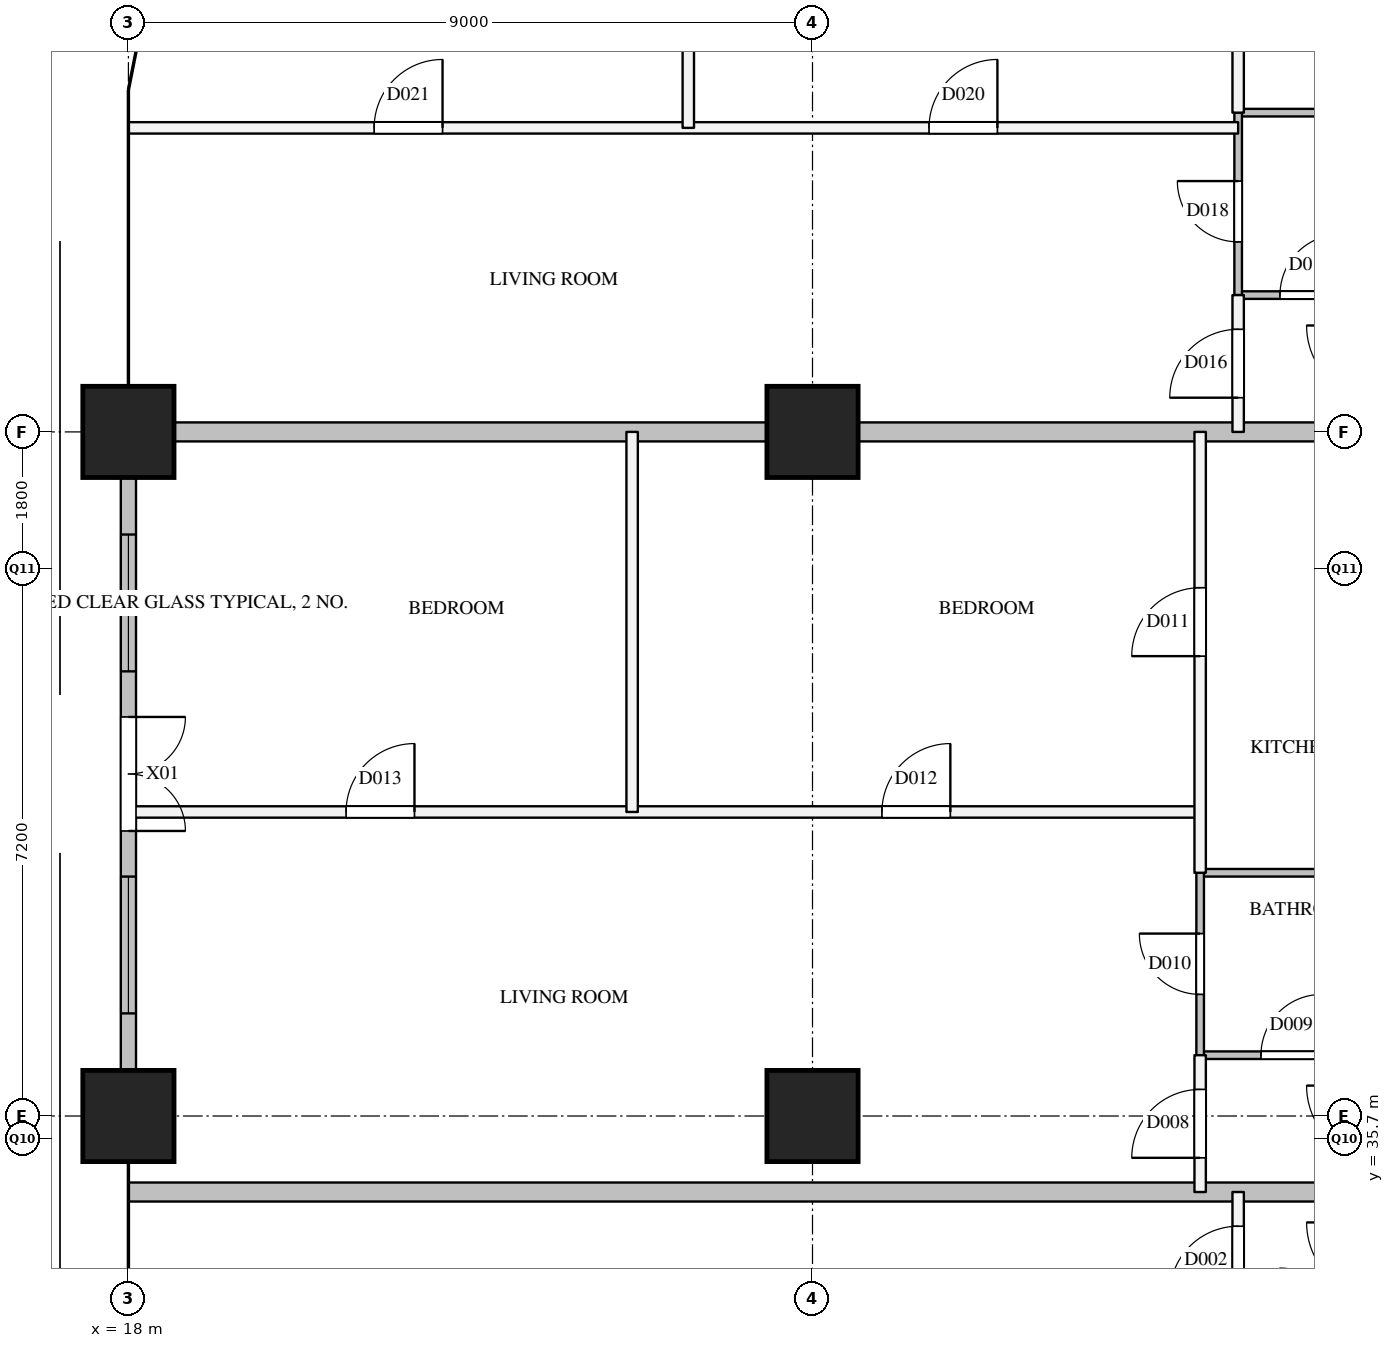
"""IFC4 building model, lengths in metres.
Left out: names, types, materials, properties, quantities, classifications, styles, units other than length and angle.
Written with IfcOpenShell. Run it as: python <this file> out.ifc"""

import sys

from ifc_helpers import new_model, si_unit, direction, frame, frame_2d, origin, origin_2d, place, context, subcontext, project, spatial, rectangle, extrude, element, fill, save


model = new_model("IFC4")
c1 = context("Model", 3, precision=1e-05, world=origin(), true_north=direction((0.0, 1.0)))
c2 = subcontext(c1, "Body", "Model", "MODEL_VIEW")
j1 = project(units=[si_unit("LENGTHUNIT", "METRE"), si_unit("PLANEANGLEUNIT", "RADIAN")], contexts=[c1])
p1 = place(None, origin())
s1 = spatial("IfcSite", under=j1, at=p1, CompositionType="ELEMENT")
p2 = place(p1, origin())
s2 = spatial("IfcBuilding", under=s1, at=p2, CompositionType="ELEMENT")
p3 = place(p2, frame((0.0, 0.0, 234.5)))
s3 = spatial("IfcBuildingStorey", under=s2, at=p3, CompositionType="ELEMENT", Elevation=234.5)
for number, where, z_axis, x_axis in (
    (1, (18.0, 36.0, 0.0), (0.0, 0.0, 1.0), (1.0, 0.0, 0.0)),
    (2, (18.0, 45.0, 0.0), (0.0, 0.0, 1.0), (1.0, 0.0, 0.0)),
    (3, (27.0, 36.0, 0.0), (0.0, 0.0, 1.0), (1.0, 0.0, 0.0)),
    (4, (27.0, 45.0, 0.0), (0.0, 0.0, 1.0), (1.0, 0.0, 0.0)),
):
    element("IfcColumn", number, at=place(p3, frame(where, z_axis=z_axis, x_axis=x_axis)), inside=s3, PredefinedType="COLUMN", context=c2, shape_type="SweptSolid", body=[
        extrude(rectangle(XDim=1.2, YDim=1.2, at=origin_2d()), origin(), (0.0, 0.0, 1.0), 3.9),
    ])
p4 = place(p3, frame((18.0, 44.4, 0.0), z_axis=(0.0, 0.0, 1.0), x_axis=(0.0, -1.0, 0.0)))
e5 = element("IfcWall", 5, at=p4, inside=s3, PredefinedType="SOLIDWALL", context=c2, shape_type="SweptSolid", body=[
    extrude(rectangle(XDim=7.8, YDim=0.2, at=frame_2d((3.9, 0.0))), origin(), (0.0, 0.0, 1.0), 2.6),
])
p5 = place(p4, frame((3.15, 0.0, 0.0)))
e6 = element("IfcOpeningElement", 6, at=p5, cuts=e5, PredefinedType="OPENING", context=c2, shape_type="SweptSolid", body=[
    extrude(rectangle(XDim=1.5, YDim=2.1, at=frame_2d((0.75, 1.05))), frame((0.0, 0.11, 0.0), z_axis=(0.0, -1.0, 0.0), x_axis=(1.0, 0.0, 0.0)), (0.0, 0.0, 1.0), 0.22),
])
p6 = place(p4, frame((0.75, 0.0, 0.1)))
e7 = element("IfcOpeningElement", 7, at=p6, cuts=e5, PredefinedType="OPENING", context=c2, shape_type="SweptSolid", body=[
    extrude(rectangle(XDim=1.8, YDim=2.2, at=frame_2d((0.9, 1.1))), frame((0.0, 0.11, 0.0), z_axis=(0.0, -1.0, 0.0), x_axis=(1.0, 0.0, 0.0)), (0.0, 0.0, 1.0), 0.22),
])
p7 = place(p4, frame((5.25, 0.0, 0.1)))
e8 = element("IfcOpeningElement", 8, at=p7, cuts=e5, PredefinedType="OPENING", context=c2, shape_type="SweptSolid", body=[
    extrude(rectangle(XDim=1.8, YDim=2.2, at=frame_2d((0.9, 1.1))), frame((0.0, 0.11, 0.0), z_axis=(0.0, -1.0, 0.0), x_axis=(1.0, 0.0, 0.0)), (0.0, 0.0, 1.0), 0.22),
])
p8 = place(p3, frame((18.025, 40.0, 0.0), z_axis=(0.0, 0.0, 1.0), x_axis=(1.0, 0.0, 0.0)))
e9 = element("IfcWall", 9, at=p8, inside=s3, PredefinedType="PARTITIONING", context=c2, shape_type="SweptSolid", body=[
    extrude(rectangle(XDim=14.075, YDim=0.15, at=frame_2d((7.037, 0.0))), origin(), (0.0, 0.0, 1.0), 2.6),
])
p9 = place(p8, frame((9.888, 0.0, 0.0)))
e10 = element("IfcOpeningElement", 10, at=p9, cuts=e9, PredefinedType="OPENING", context=c2, shape_type="SweptSolid", body=[
    extrude(rectangle(XDim=0.9, YDim=2.1, at=frame_2d((0.45, 1.05))), frame((0.0, 0.085, 0.0), z_axis=(0.0, -1.0, 0.0), x_axis=(1.0, 0.0, 0.0)), (0.0, 0.0, 1.0), 0.17),
])
p10 = place(p8, frame((2.838, 0.0, 0.0)))
e11 = element("IfcOpeningElement", 11, at=p10, cuts=e9, PredefinedType="OPENING", context=c2, shape_type="SweptSolid", body=[
    extrude(rectangle(XDim=0.9, YDim=2.1, at=frame_2d((0.45, 1.05))), frame((0.0, 0.085, 0.0), z_axis=(0.0, -1.0, 0.0), x_axis=(1.0, 0.0, 0.0)), (0.0, 0.0, 1.0), 0.17),
])
p11 = place(p3, frame((18.0, 49.0, 0.0), z_axis=(0.0, 0.0, 1.0), x_axis=(1.0, 0.0, 0.0)))
e12 = element("IfcWall", 12, at=p11, inside=s3, PredefinedType="PARTITIONING", context=c2, shape_type="SweptSolid", body=[
    extrude(rectangle(XDim=14.6, YDim=0.15, at=frame_2d((7.3, 0.0))), origin(), (0.0, 0.0, 1.0), 2.6),
])
p12 = place(p11, frame((10.533, 0.0, 0.0)))
e13 = element("IfcOpeningElement", 13, at=p12, cuts=e12, PredefinedType="OPENING", context=c2, shape_type="SweptSolid", body=[
    extrude(rectangle(XDim=0.9, YDim=2.1, at=frame_2d((0.45, 1.05))), frame((0.0, 0.085, 0.0), z_axis=(0.0, -1.0, 0.0), x_axis=(1.0, 0.0, 0.0)), (0.0, 0.0, 1.0), 0.17),
])
p13 = place(p11, frame((3.233, 0.0, 0.0)))
e14 = element("IfcOpeningElement", 14, at=p13, cuts=e12, PredefinedType="OPENING", context=c2, shape_type="SweptSolid", body=[
    extrude(rectangle(XDim=0.9, YDim=2.1, at=frame_2d((0.45, 1.05))), frame((0.0, 0.085, 0.0), z_axis=(0.0, -1.0, 0.0), x_axis=(1.0, 0.0, 0.0)), (0.0, 0.0, 1.0), 0.17),
])
p14 = place(p3, frame((24.627, 40.0, 0.0), z_axis=(0.0, 0.0, 1.0), x_axis=(0.0, 1.0, 0.0)))
e15 = element("IfcWall", 15, at=p14, inside=s3, PredefinedType="PARTITIONING", context=c2, shape_type="SweptSolid", body=[
    extrude(rectangle(XDim=5.0, YDim=0.15, at=frame_2d((2.5, 0.0))), origin(), (0.0, 0.0, 1.0), 3.6),
])
p15 = place(p3, frame((25.366, 49.0, 0.0), z_axis=(0.0, 0.0, 1.0), x_axis=(0.0, 1.0, 0.0)))
e16 = element("IfcWall", 16, at=p15, inside=s3, PredefinedType="PARTITIONING", context=c2, shape_type="SweptSolid", body=[
    extrude(rectangle(XDim=5.0, YDim=0.15, at=frame_2d((2.5, 0.0))), origin(), (0.0, 0.0, 1.0), 2.6),
])
p16 = place(p3, frame((32.1, 35.0, 0.0), z_axis=(0.0, 0.0, 1.0), x_axis=(0.0, 1.0, 0.0)))
e17 = element("IfcWall", 17, at=p16, inside=s3, PredefinedType="PARTITIONING", context=c2, shape_type="SweptSolid", body=[
    extrude(rectangle(XDim=1.8, YDim=0.15, at=frame_2d((0.9, 0.0))), origin(), (0.0, 0.0, 1.0), 3.6),
])
p17 = place(p16, frame((0.45, 0.0, 0.0)))
e18 = element("IfcOpeningElement", 18, at=p17, cuts=e17, PredefinedType="OPENING", context=c2, shape_type="SweptSolid", body=[
    extrude(rectangle(XDim=0.9, YDim=2.1, at=frame_2d((0.45, 1.05))), frame((0.0, 0.085, 0.0), z_axis=(0.0, -1.0, 0.0), x_axis=(1.0, 0.0, 0.0)), (0.0, 0.0, 1.0), 0.17),
])
p18 = place(p3, frame((32.1, 39.2, 0.0), z_axis=(0.0, 0.0, 1.0), x_axis=(0.0, 1.0, 0.0)))
e19 = element("IfcWall", 19, at=p18, inside=s3, PredefinedType="PARTITIONING", context=c2, shape_type="SweptSolid", body=[
    extrude(rectangle(XDim=5.8, YDim=0.15, at=frame_2d((2.9, 0.0))), origin(), (0.0, 0.0, 1.0), 3.6),
])
p19 = place(p18, frame((2.85, 0.0, 0.0)))
e20 = element("IfcOpeningElement", 20, at=p19, cuts=e19, PredefinedType="OPENING", context=c2, shape_type="SweptSolid", body=[
    extrude(rectangle(XDim=0.9, YDim=2.1, at=frame_2d((0.45, 1.05))), frame((0.0, 0.085, 0.0), z_axis=(0.0, -1.0, 0.0), x_axis=(1.0, 0.0, 0.0)), (0.0, 0.0, 1.0), 0.17),
])
p20 = place(p3, frame((32.6, 33.2, 0.0), z_axis=(0.0, 0.0, 1.0), x_axis=(0.0, 1.0, 0.0)))
e21 = element("IfcWall", 21, at=p20, inside=s3, PredefinedType="PARTITIONING", context=c2, shape_type="SweptSolid", body=[
    extrude(rectangle(XDim=1.8, YDim=0.15, at=frame_2d((0.9, 0.0))), origin(), (0.0, 0.0, 1.0), 3.6),
])
p21 = place(p20, frame((0.45, 0.0, 0.0)))
e22 = element("IfcOpeningElement", 22, at=p21, cuts=e21, PredefinedType="OPENING", context=c2, shape_type="SweptSolid", body=[
    extrude(rectangle(XDim=0.9, YDim=2.1, at=frame_2d((0.45, 1.05))), frame((0.0, 0.085, 0.0), z_axis=(0.0, -1.0, 0.0), x_axis=(1.0, 0.0, 0.0)), (0.0, 0.0, 1.0), 0.17),
])
p22 = place(p3, frame((32.6, 45.0, 0.0), z_axis=(0.0, 0.0, 1.0), x_axis=(0.0, 1.0, 0.0)))
e23 = element("IfcWall", 23, at=p22, inside=s3, PredefinedType="PARTITIONING", context=c2, shape_type="SweptSolid", body=[
    extrude(rectangle(XDim=1.8, YDim=0.15, at=frame_2d((0.9, 0.0))), origin(), (0.0, 0.0, 1.0), 3.6),
])
p23 = place(p22, frame((0.45, 0.0, 0.0)))
e24 = element("IfcOpeningElement", 24, at=p23, cuts=e23, PredefinedType="OPENING", context=c2, shape_type="SweptSolid", body=[
    extrude(rectangle(XDim=0.9, YDim=2.1, at=frame_2d((0.45, 1.05))), frame((0.0, 0.085, 0.0), z_axis=(0.0, -1.0, 0.0), x_axis=(1.0, 0.0, 0.0)), (0.0, 0.0, 1.0), 0.17),
])
p24 = place(p3, frame((32.6, 49.2, 0.0), z_axis=(0.0, 0.0, 1.0), x_axis=(0.0, 1.0, 0.0)))
e25 = element("IfcWall", 25, at=p24, inside=s3, PredefinedType="PARTITIONING", context=c2, shape_type="SweptSolid", body=[
    extrude(rectangle(XDim=4.8, YDim=0.15, at=frame_2d((2.4, 0.0))), origin(), (0.0, 0.0, 1.0), 2.6),
])
p25 = place(p24, frame((1.95, 0.0, 0.0)))
e26 = element("IfcOpeningElement", 26, at=p25, cuts=e25, PredefinedType="OPENING", context=c2, shape_type="SweptSolid", body=[
    extrude(rectangle(XDim=0.9, YDim=2.1, at=frame_2d((0.45, 1.05))), frame((0.0, 0.085, 0.0), z_axis=(0.0, -1.0, 0.0), x_axis=(1.0, 0.0, 0.0)), (0.0, 0.0, 1.0), 0.17),
])
p26 = place(p3, frame((18.0, 35.0, 0.0), z_axis=(0.0, 0.0, 1.0), x_axis=(1.0, 0.0, 0.0)))
e27 = element("IfcWall", 27, at=p26, inside=s3, PredefinedType="PARTITIONING", context=c2, shape_type="SweptSolid", body=[
    extrude(rectangle(XDim=16.5, YDim=0.25, at=frame_2d((8.25, 0.0))), origin(), (0.0, 0.0, 1.0), 2.6),
])
p27 = place(p3, frame((18.0, 45.0, 0.0), z_axis=(0.0, 0.0, 1.0), x_axis=(1.0, 0.0, 0.0)))
e28 = element("IfcWall", 28, at=p27, inside=s3, PredefinedType="PARTITIONING", context=c2, shape_type="SweptSolid", body=[
    extrude(rectangle(XDim=16.5, YDim=0.25, at=frame_2d((8.25, 0.0))), origin(), (0.0, 0.0, 1.0), 3.6),
])
p28 = place(p3, frame((32.1, 36.8, 0.0), z_axis=(0.0, 0.0, 1.0), x_axis=(1.0, 0.0, 0.0)))
e29 = element("IfcWall", 29, at=p28, inside=s3, PredefinedType="PARTITIONING", context=c2, shape_type="SweptSolid", body=[
    extrude(rectangle(XDim=2.4, YDim=0.1, at=frame_2d((1.2, 0.0))), origin(), (0.0, 0.0, 1.0), 3.6),
])
p29 = place(p28, frame((0.8, 0.0, 0.0)))
e30 = element("IfcOpeningElement", 30, at=p29, cuts=e29, PredefinedType="OPENING", context=c2, shape_type="SweptSolid", body=[
    extrude(rectangle(XDim=0.8, YDim=2.1, at=frame_2d((0.4, 1.05))), frame((0.0, 0.06, 0.0), z_axis=(0.0, -1.0, 0.0), x_axis=(1.0, 0.0, 0.0)), (0.0, 0.0, 1.0), 0.12),
])
p30 = place(p3, frame((32.1, 39.2, 0.0), z_axis=(0.0, 0.0, 1.0), x_axis=(1.0, 0.0, 0.0)))
e31 = element("IfcWall", 31, at=p30, inside=s3, PredefinedType="PARTITIONING", context=c2, shape_type="SweptSolid", body=[
    extrude(rectangle(XDim=2.4, YDim=0.1, at=frame_2d((1.2, 0.0))), origin(), (0.0, 0.0, 1.0), 3.6),
])
p31 = place(p3, frame((32.6, 46.8, 0.0), z_axis=(0.0, 0.0, 1.0), x_axis=(1.0, 0.0, 0.0)))
e32 = element("IfcWall", 32, at=p31, inside=s3, PredefinedType="PARTITIONING", context=c2, shape_type="SweptSolid", body=[
    extrude(rectangle(XDim=1.9, YDim=0.1, at=frame_2d((0.95, 0.0))), origin(), (0.0, 0.0, 1.0), 3.6),
])
p32 = place(p31, frame((0.55, 0.0, 0.0)))
e33 = element("IfcOpeningElement", 33, at=p32, cuts=e32, PredefinedType="OPENING", context=c2, shape_type="SweptSolid", body=[
    extrude(rectangle(XDim=0.8, YDim=2.1, at=frame_2d((0.4, 1.05))), frame((0.0, 0.06, 0.0), z_axis=(0.0, -1.0, 0.0), x_axis=(1.0, 0.0, 0.0)), (0.0, 0.0, 1.0), 0.12),
])
p33 = place(p3, frame((32.6, 49.2, 0.0), z_axis=(0.0, 0.0, 1.0), x_axis=(1.0, 0.0, 0.0)))
e34 = element("IfcWall", 34, at=p33, inside=s3, PredefinedType="PARTITIONING", context=c2, shape_type="SweptSolid", body=[
    extrude(rectangle(XDim=1.9, YDim=0.1, at=frame_2d((0.95, 0.0))), origin(), (0.0, 0.0, 1.0), 3.6),
])
p34 = place(p3, frame((32.1, 36.8, 0.0), z_axis=(0.0, 0.0, 1.0), x_axis=(0.0, 1.0, 0.0)))
e35 = element("IfcWall", 35, at=p34, inside=s3, PredefinedType="PARTITIONING", context=c2, shape_type="SweptSolid", body=[
    extrude(rectangle(XDim=2.4, YDim=0.1, at=frame_2d((1.2, 0.0))), origin(), (0.0, 0.0, 1.0), 3.6),
])
p35 = place(p34, frame((0.8, 0.0, 0.0)))
e36 = element("IfcOpeningElement", 36, at=p35, cuts=e35, PredefinedType="OPENING", context=c2, shape_type="SweptSolid", body=[
    extrude(rectangle(XDim=0.8, YDim=2.1, at=frame_2d((0.4, 1.05))), frame((0.0, 0.06, 0.0), z_axis=(0.0, -1.0, 0.0), x_axis=(1.0, 0.0, 0.0)), (0.0, 0.0, 1.0), 0.12),
])
p36 = place(p3, frame((32.6, 46.8, 0.0), z_axis=(0.0, 0.0, 1.0), x_axis=(0.0, 1.0, 0.0)))
e37 = element("IfcWall", 37, at=p36, inside=s3, PredefinedType="PARTITIONING", context=c2, shape_type="SweptSolid", body=[
    extrude(rectangle(XDim=2.4, YDim=0.1, at=frame_2d((1.2, 0.0))), origin(), (0.0, 0.0, 1.0), 3.6),
])
p37 = place(p36, frame((0.7, 0.0, 0.0)))
e38 = element("IfcOpeningElement", 38, at=p37, cuts=e37, PredefinedType="OPENING", context=c2, shape_type="SweptSolid", body=[
    extrude(rectangle(XDim=0.8, YDim=2.1, at=frame_2d((0.4, 1.05))), frame((0.0, 0.06, 0.0), z_axis=(0.0, -1.0, 0.0), x_axis=(1.0, 0.0, 0.0)), (0.0, 0.0, 1.0), 0.12),
])
p38 = place(p5, origin())
e39 = element("IfcDoor", 39, at=p38, inside=s3, OperationType="DOUBLE_DOOR_SINGLE_SWING", PredefinedType="DOOR", context=c2, shape_type="SweptSolid", body=[
    extrude(rectangle(XDim=1.5, YDim=2.1, at=frame_2d((0.75, 1.05))), frame((0.0, 0.025, 0.0), z_axis=(0.0, -1.0, 0.0), x_axis=(1.0, 0.0, 0.0)), (0.0, 0.0, 1.0), 0.05),
])
fill(e6, e39)
p39 = place(p6, origin())
e40 = element("IfcWindow", 40, at=p39, inside=s3, PartitioningType="SINGLE_PANEL", PredefinedType="WINDOW", context=c2, shape_type="SweptSolid", body=[
    extrude(rectangle(XDim=1.8, YDim=2.2, at=frame_2d((0.9, 1.1))), frame((0.0, 0.03, 0.0), z_axis=(0.0, -1.0, 0.0), x_axis=(1.0, 0.0, 0.0)), (0.0, 0.0, 1.0), 0.06),
])
fill(e7, e40)
p40 = place(p7, origin())
e41 = element("IfcWindow", 41, at=p40, inside=s3, PartitioningType="SINGLE_PANEL", PredefinedType="WINDOW", context=c2, shape_type="SweptSolid", body=[
    extrude(rectangle(XDim=1.8, YDim=2.2, at=frame_2d((0.9, 1.1))), frame((0.0, 0.03, 0.0), z_axis=(0.0, -1.0, 0.0), x_axis=(1.0, 0.0, 0.0)), (0.0, 0.0, 1.0), 0.06),
])
fill(e8, e41)
p41 = place(p21, origin())
e42 = element("IfcDoor", 42, at=p41, inside=s3, OperationType="SINGLE_SWING_LEFT", PredefinedType="DOOR", context=c2, shape_type="SweptSolid", body=[
    extrude(rectangle(XDim=0.9, YDim=2.1, at=frame_2d((0.45, 1.05))), frame((0.0, 0.025, 0.0), z_axis=(0.0, -1.0, 0.0), x_axis=(1.0, 0.0, 0.0)), (0.0, 0.0, 1.0), 0.05),
])
fill(e22, e42)
p42 = place(p17, origin())
e43 = element("IfcDoor", 43, at=p42, inside=s3, OperationType="SINGLE_SWING_LEFT", PredefinedType="DOOR", context=c2, shape_type="SweptSolid", body=[
    extrude(rectangle(XDim=0.9, YDim=2.1, at=frame_2d((0.45, 1.05))), frame((0.0, 0.025, 0.0), z_axis=(0.0, -1.0, 0.0), x_axis=(1.0, 0.0, 0.0)), (0.0, 0.0, 1.0), 0.05),
])
fill(e18, e43)
p43 = place(p29, origin())
e44 = element("IfcDoor", 44, at=p43, inside=s3, OperationType="SINGLE_SWING_RIGHT", PredefinedType="DOOR", context=c2, shape_type="SweptSolid", body=[
    extrude(rectangle(XDim=0.8, YDim=2.1, at=frame_2d((0.4, 1.05))), frame((0.0, 0.025, 0.0), z_axis=(0.0, -1.0, 0.0), x_axis=(1.0, 0.0, 0.0)), (0.0, 0.0, 1.0), 0.05),
])
fill(e30, e44)
p44 = place(p35, origin())
e45 = element("IfcDoor", 45, at=p44, inside=s3, OperationType="SINGLE_SWING_RIGHT", PredefinedType="DOOR", context=c2, shape_type="SweptSolid", body=[
    extrude(rectangle(XDim=0.8, YDim=2.1, at=frame_2d((0.4, 1.05))), frame((0.0, 0.025, 0.0), z_axis=(0.0, -1.0, 0.0), x_axis=(1.0, 0.0, 0.0)), (0.0, 0.0, 1.0), 0.05),
])
fill(e36, e45)
p45 = place(p19, origin())
e46 = element("IfcDoor", 46, at=p45, inside=s3, OperationType="SINGLE_SWING_LEFT", PredefinedType="DOOR", context=c2, shape_type="SweptSolid", body=[
    extrude(rectangle(XDim=0.9, YDim=2.1, at=frame_2d((0.45, 1.05))), frame((0.0, 0.025, 0.0), z_axis=(0.0, -1.0, 0.0), x_axis=(1.0, 0.0, 0.0)), (0.0, 0.0, 1.0), 0.05),
])
fill(e20, e46)
p46 = place(p9, origin())
e47 = element("IfcDoor", 47, at=p46, inside=s3, OperationType="SINGLE_SWING_RIGHT", PredefinedType="DOOR", context=c2, shape_type="SweptSolid", body=[
    extrude(rectangle(XDim=0.9, YDim=2.1, at=frame_2d((0.45, 1.05))), frame((0.0, 0.025, 0.0), z_axis=(0.0, -1.0, 0.0), x_axis=(1.0, 0.0, 0.0)), (0.0, 0.0, 1.0), 0.05),
])
fill(e10, e47)
p47 = place(p10, origin())
e48 = element("IfcDoor", 48, at=p47, inside=s3, OperationType="SINGLE_SWING_RIGHT", PredefinedType="DOOR", context=c2, shape_type="SweptSolid", body=[
    extrude(rectangle(XDim=0.9, YDim=2.1, at=frame_2d((0.45, 1.05))), frame((0.0, 0.025, 0.0), z_axis=(0.0, -1.0, 0.0), x_axis=(1.0, 0.0, 0.0)), (0.0, 0.0, 1.0), 0.05),
])
fill(e11, e48)
p48 = place(p23, origin())
e49 = element("IfcDoor", 49, at=p48, inside=s3, OperationType="SINGLE_SWING_LEFT", PredefinedType="DOOR", context=c2, shape_type="SweptSolid", body=[
    extrude(rectangle(XDim=0.9, YDim=2.1, at=frame_2d((0.45, 1.05))), frame((0.0, 0.025, 0.0), z_axis=(0.0, -1.0, 0.0), x_axis=(1.0, 0.0, 0.0)), (0.0, 0.0, 1.0), 0.05),
])
fill(e24, e49)
p49 = place(p32, origin())
e50 = element("IfcDoor", 50, at=p49, inside=s3, OperationType="SINGLE_SWING_RIGHT", PredefinedType="DOOR", context=c2, shape_type="SweptSolid", body=[
    extrude(rectangle(XDim=0.8, YDim=2.1, at=frame_2d((0.4, 1.05))), frame((0.0, 0.025, 0.0), z_axis=(0.0, -1.0, 0.0), x_axis=(1.0, 0.0, 0.0)), (0.0, 0.0, 1.0), 0.05),
])
fill(e33, e50)
p50 = place(p37, origin())
e51 = element("IfcDoor", 51, at=p50, inside=s3, OperationType="SINGLE_SWING_RIGHT", PredefinedType="DOOR", context=c2, shape_type="SweptSolid", body=[
    extrude(rectangle(XDim=0.8, YDim=2.1, at=frame_2d((0.4, 1.05))), frame((0.0, 0.025, 0.0), z_axis=(0.0, -1.0, 0.0), x_axis=(1.0, 0.0, 0.0)), (0.0, 0.0, 1.0), 0.05),
])
fill(e38, e51)
p51 = place(p12, origin())
e52 = element("IfcDoor", 52, at=p51, inside=s3, OperationType="SINGLE_SWING_RIGHT", PredefinedType="DOOR", context=c2, shape_type="SweptSolid", body=[
    extrude(rectangle(XDim=0.9, YDim=2.1, at=frame_2d((0.45, 1.05))), frame((0.0, 0.025, 0.0), z_axis=(0.0, -1.0, 0.0), x_axis=(1.0, 0.0, 0.0)), (0.0, 0.0, 1.0), 0.05),
])
fill(e13, e52)
p52 = place(p13, origin())
e53 = element("IfcDoor", 53, at=p52, inside=s3, OperationType="SINGLE_SWING_RIGHT", PredefinedType="DOOR", context=c2, shape_type="SweptSolid", body=[
    extrude(rectangle(XDim=0.9, YDim=2.1, at=frame_2d((0.45, 1.05))), frame((0.0, 0.025, 0.0), z_axis=(0.0, -1.0, 0.0), x_axis=(1.0, 0.0, 0.0)), (0.0, 0.0, 1.0), 0.05),
])
fill(e14, e53)
save(model, sys.argv[1])
